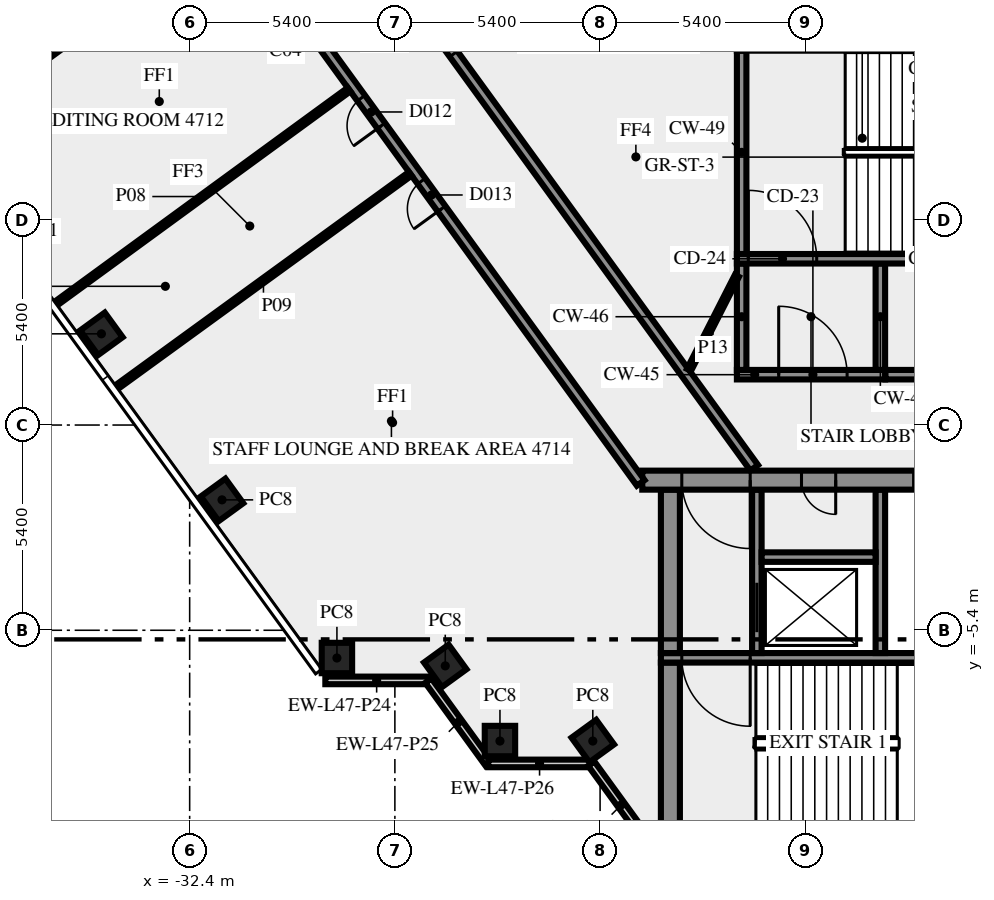
"""IFC4 building model, lengths in metres.
Left out: names, types, materials, properties, quantities, classifications, styles, units other than length and angle.
Written with IfcOpenShell. Run it as: python <this file> out.ifc"""

import sys

from ifc_helpers import new_model, si_unit, direction, frame, frame_2d, origin, origin_2d, place, context, subcontext, project, spatial, rectangle, extrude, element, fill, save


model = new_model("IFC4")
c1 = context("Model", 3, precision=1e-05, world=origin(), true_north=direction((0.0, 1.0)))
c2 = subcontext(c1, "Body", "Model", "MODEL_VIEW")
j1 = project(units=[si_unit("LENGTHUNIT", "METRE"), si_unit("PLANEANGLEUNIT", "RADIAN")], contexts=[c1])
p1 = place(None, origin())
s1 = spatial("IfcSite", under=j1, at=p1, CompositionType="ELEMENT")
p2 = place(p1, origin())
s2 = spatial("IfcBuilding", under=s1, at=p2, CompositionType="ELEMENT")
p3 = place(p2, frame((0.0, 0.0, 202.0)))
s3 = spatial("IfcBuildingStorey", under=s2, at=p3, CompositionType="ELEMENT", Elevation=202.0)
for number, where, z_axis, x_axis in (
    (1, (-34.722, 2.4, 0.0), (0.0, 0.0, 1.0), (0.588, -0.809, 0.0)),
    (2, (-31.548, -1.969, 0.0), (0.0, 0.0, 1.0), (0.588, -0.809, 0.0)),
    (3, (-28.525, -6.13, 0.0), (0.0, 0.0, 1.0), (1.0, 0.0, 0.0)),
    (4, (-25.674, -6.337, 0.0), (0.0, 0.0, 1.0), (0.588, -0.809, 0.0)),
    (5, (-24.235, -8.315, 0.0), (0.0, 0.0, 1.0), (1.0, 0.0, 0.0)),
    (6, (-21.792, -8.315, 0.0), (0.0, 0.0, 1.0), (0.588, -0.809, 0.0)),
):
    element("IfcColumn", number, at=place(p3, frame(where, z_axis=z_axis, x_axis=x_axis)), inside=s3, PredefinedType="COLUMN", context=c2, shape_type="SweptSolid", body=[
        extrude(rectangle(XDim=0.8, YDim=0.8, at=origin_2d()), origin(), (0.0, 0.0, 1.0), 3.65),
    ])
p4 = place(p3, frame((-28.83, -6.719, 0.0), z_axis=(0.0, 0.0, 1.0), x_axis=(1.0, 0.0, 0.0)))
e7 = element("IfcWall", 7, at=p4, inside=s3, PredefinedType="SOLIDWALL", context=c2, shape_type="SweptSolid", body=[
    extrude(rectangle(XDim=2.7, YDim=0.2, at=frame_2d((1.35, 0.0))), origin(), (0.0, 0.0, 1.0), 3.65),
])
p5 = place(p3, frame((-26.12, -6.724, 0.0), z_axis=(0.0, 0.0, 1.0), x_axis=(0.587720002413, -0.809064397168, 0.0)))
e8 = element("IfcWall", 8, at=p5, inside=s3, PredefinedType="SOLIDWALL", context=c2, shape_type="SweptSolid", body=[
    extrude(rectangle(XDim=2.7, YDim=0.2, at=frame_2d((1.35, 0.0))), origin(), (0.0, 0.0, 1.0), 3.65),
])
p6 = place(p3, frame((-24.543, -8.904, 0.0), z_axis=(0.0, 0.0, 1.0), x_axis=(1.0, 0.0, 0.0)))
e9 = element("IfcWall", 9, at=p6, inside=s3, PredefinedType="SOLIDWALL", context=c2, shape_type="SweptSolid", body=[
    extrude(rectangle(XDim=2.7, YDim=0.2, at=frame_2d((1.35, 0.0))), origin(), (0.0, 0.0, 1.0), 3.65),
])
p7 = place(p3, frame((-21.833, -8.909, 0.0), z_axis=(0.0, 0.0, 1.0), x_axis=(0.587766567315, -0.809030569476, 0.0)))
e10 = element("IfcWall", 10, at=p7, inside=s3, PredefinedType="SOLIDWALL", context=c2, shape_type="SweptSolid", body=[
    extrude(rectangle(XDim=2.688, YDim=0.2, at=frame_2d((1.344, 0.0))), origin(), (0.0, 0.0, 1.0), 3.65),
])
p8 = place(p3, frame((-19.75, -10.5, 0.0), z_axis=(0.0, 0.0, 1.0), x_axis=(0.0, 1.0, 0.0)))
e11 = element("IfcWall", 11, at=p8, inside=s3, PredefinedType="SHEAR", context=c2, shape_type="SweptSolid", body=[
    extrude(rectangle(XDim=4.25, YDim=0.5, at=frame_2d((2.125, 0.0))), origin(), (0.0, 0.0, 1.0), 3.65),
])
p9 = place(p3, frame((-9.2, -6.125, 0.0), z_axis=(0.0, 0.0, 1.0), x_axis=(-1.0, 0.0, 0.0)))
e12 = element("IfcWall", 12, at=p9, inside=s3, PredefinedType="SHEAR", context=c2, shape_type="SweptSolid", body=[
    extrude(rectangle(XDim=10.8, YDim=0.25, at=frame_2d((5.4, 0.0))), origin(), (0.0, 0.0, 1.0), 3.65),
])
p10 = place(p9, frame((8.45, 0.0, 0.0)))
e13 = element("IfcOpeningElement", 13, at=p10, cuts=e12, PredefinedType="OPENING", context=c2, shape_type="SweptSolid", body=[
    extrude(rectangle(XDim=1.8, YDim=2.1, at=frame_2d((0.9, 1.05))), frame((0.0, 0.135, 0.0), z_axis=(0.0, -1.0, 0.0), x_axis=(1.0, 0.0, 0.0)), (0.0, 0.0, 1.0), 0.27),
])
p11 = place(p3, frame((-19.75, -6.0, 0.0), z_axis=(0.0, 0.0, 1.0), x_axis=(0.0, 1.0, 0.0)))
e14 = element("IfcWall", 14, at=p11, inside=s3, PredefinedType="SHEAR", context=c2, shape_type="SweptSolid", body=[
    extrude(rectangle(XDim=4.3, YDim=0.5, at=frame_2d((2.15, 0.0))), origin(), (0.0, 0.0, 1.0), 3.65),
])
p12 = place(p3, frame((-17.475, -6.0, 0.0), z_axis=(0.0, 0.0, 1.0), x_axis=(0.0, 1.0, 0.0)))
e15 = element("IfcWall", 15, at=p12, inside=s3, PredefinedType="SHEAR", context=c2, shape_type="SweptSolid", body=[
    extrude(rectangle(XDim=4.3, YDim=0.25, at=frame_2d((2.15, 0.0))), origin(), (0.0, 0.0, 1.0), 3.65),
])
p13 = place(p12, frame((0.55, 0.0, 0.0)))
e16 = element("IfcOpeningElement", 16, at=p13, cuts=e15, PredefinedType="OPENING", context=c2, shape_type="SweptSolid", body=[
    extrude(rectangle(XDim=1.3, YDim=2.1, at=frame_2d((0.65, 1.05))), frame((0.0, 0.135, 0.0), z_axis=(0.0, -1.0, 0.0), x_axis=(1.0, 0.0, 0.0)), (0.0, 0.0, 1.0), 0.27),
])
p14 = place(p3, frame((-14.225, -6.0, 0.0), z_axis=(0.0, 0.0, 1.0), x_axis=(0.0, 1.0, 0.0)))
e17 = element("IfcWall", 17, at=p14, inside=s3, PredefinedType="SHEAR", context=c2, shape_type="SweptSolid", body=[
    extrude(rectangle(XDim=4.3, YDim=0.25, at=frame_2d((2.15, 0.0))), origin(), (0.0, 0.0, 1.0), 3.65),
])
p15 = place(p3, frame((-17.35, -3.475, 0.0), z_axis=(0.0, 0.0, 1.0), x_axis=(1.0, 0.0, 0.0)))
e18 = element("IfcWall", 18, at=p15, inside=s3, PredefinedType="SHEAR", context=c2, shape_type="SweptSolid", body=[
    extrude(rectangle(XDim=3.0, YDim=0.25, at=frame_2d((1.5, 0.0))), origin(), (0.0, 0.0, 1.0), 3.65),
])
p16 = place(p3, frame((20.49, -1.45, 0.0), z_axis=(0.0, 0.0, 1.0), x_axis=(-1.0, 0.0, 0.0)))
e19 = element("IfcWall", 19, at=p16, inside=s3, PredefinedType="SHEAR", context=c2, shape_type="SweptSolid", body=[
    extrude(rectangle(XDim=40.98, YDim=0.5, at=frame_2d((20.49, 0.0))), origin(), (0.0, 0.0, 1.0), 3.65),
])
p17 = place(p16, frame((38.14, 0.0, 0.0)))
e20 = element("IfcOpeningElement", 20, at=p17, cuts=e19, PredefinedType="OPENING", context=c2, shape_type="SweptSolid", body=[
    extrude(rectangle(XDim=1.8, YDim=2.1, at=frame_2d((0.9, 1.05))), frame((0.0, 0.26, 0.0), z_axis=(0.0, -1.0, 0.0), x_axis=(1.0, 0.0, 0.0)), (0.0, 0.0, 1.0), 0.52),
])
p18 = place(p16, frame((35.89, 0.0, 0.0)))
e21 = element("IfcOpeningElement", 21, at=p18, cuts=e19, PredefinedType="OPENING", context=c2, shape_type="SweptSolid", body=[
    extrude(rectangle(XDim=0.9, YDim=2.1, at=frame_2d((0.45, 1.05))), frame((0.0, 0.26, 0.0), z_axis=(0.0, -1.0, 0.0), x_axis=(1.0, 0.0, 0.0)), (0.0, 0.0, 1.0), 0.52),
])
p19 = place(p16, frame((32.94, 0.0, 0.0)))
e22 = element("IfcOpeningElement", 22, at=p19, cuts=e19, PredefinedType="OPENING", context=c2, shape_type="SweptSolid", body=[
    extrude(rectangle(XDim=0.9, YDim=2.1, at=frame_2d((0.45, 1.05))), frame((0.0, 0.26, 0.0), z_axis=(0.0, -1.0, 0.0), x_axis=(1.0, 0.0, 0.0)), (0.0, 0.0, 1.0), 0.52),
])
p20 = place(p16, frame((30.302, 0.0, 0.0)))
e23 = element("IfcOpeningElement", 23, at=p20, cuts=e19, PredefinedType="OPENING", context=c2, shape_type="SweptSolid", body=[
    extrude(rectangle(XDim=0.9, YDim=2.1, at=frame_2d((0.45, 1.05))), frame((0.0, 0.26, 0.0), z_axis=(0.0, -1.0, 0.0), x_axis=(1.0, 0.0, 0.0)), (0.0, 0.0, 1.0), 0.52),
])
p21 = place(p16, frame((26.577, 0.0, 0.0)))
e24 = element("IfcOpeningElement", 24, at=p21, cuts=e19, PredefinedType="OPENING", context=c2, shape_type="SweptSolid", body=[
    extrude(rectangle(XDim=0.9, YDim=2.1, at=frame_2d((0.45, 1.05))), frame((0.0, 0.26, 0.0), z_axis=(0.0, -1.0, 0.0), x_axis=(1.0, 0.0, 0.0)), (0.0, 0.0, 1.0), 0.52),
])
p22 = place(p16, frame((19.59, 0.0, 0.0)))
e25 = element("IfcOpeningElement", 25, at=p22, cuts=e19, PredefinedType="OPENING", context=c2, shape_type="SweptSolid", body=[
    extrude(rectangle(XDim=2.0, YDim=2.1, at=frame_2d((1.0, 1.05))), frame((0.0, 0.26, 0.0), z_axis=(0.0, -1.0, 0.0), x_axis=(1.0, 0.0, 0.0)), (0.0, 0.0, 1.0), 0.52),
])
p23 = place(p16, frame((7.14, 0.0, 0.0)))
e26 = element("IfcOpeningElement", 26, at=p23, cuts=e19, PredefinedType="OPENING", context=c2, shape_type="SweptSolid", body=[
    extrude(rectangle(XDim=0.9, YDim=2.1, at=frame_2d((0.45, 1.05))), frame((0.0, 0.26, 0.0), z_axis=(0.0, -1.0, 0.0), x_axis=(1.0, 0.0, 0.0)), (0.0, 0.0, 1.0), 0.52),
])
p24 = place(p16, frame((5.028, 0.0, 0.0)))
e27 = element("IfcOpeningElement", 27, at=p24, cuts=e19, PredefinedType="OPENING", context=c2, shape_type="SweptSolid", body=[
    extrude(rectangle(XDim=0.8, YDim=2.1, at=frame_2d((0.4, 1.05))), frame((0.0, 0.26, 0.0), z_axis=(0.0, -1.0, 0.0), x_axis=(1.0, 0.0, 0.0)), (0.0, 0.0, 1.0), 0.52),
])
p25 = place(p16, frame((3.452, 0.0, 0.0)))
e28 = element("IfcOpeningElement", 28, at=p25, cuts=e19, PredefinedType="OPENING", context=c2, shape_type="SweptSolid", body=[
    extrude(rectangle(XDim=0.8, YDim=2.1, at=frame_2d((0.4, 1.05))), frame((0.0, 0.26, 0.0), z_axis=(0.0, -1.0, 0.0), x_axis=(1.0, 0.0, 0.0)), (0.0, 0.0, 1.0), 0.52),
])
p26 = place(p16, frame((1.04, 0.0, 0.0)))
e29 = element("IfcOpeningElement", 29, at=p26, cuts=e19, PredefinedType="OPENING", context=c2, shape_type="SweptSolid", body=[
    extrude(rectangle(XDim=1.8, YDim=2.1, at=frame_2d((0.9, 1.05))), frame((0.0, 0.26, 0.0), z_axis=(0.0, -1.0, 0.0), x_axis=(1.0, 0.0, 0.0)), (0.0, 0.0, 1.0), 0.52),
])
p27 = place(p3, frame((-18.0, 1.325, 0.0), z_axis=(0.0, 0.0, 1.0), x_axis=(1.0, 0.0, 0.0)))
e30 = element("IfcWall", 30, at=p27, inside=s3, PredefinedType="SHEAR", context=c2, shape_type="SweptSolid", body=[
    extrude(rectangle(XDim=3.9, YDim=0.25, at=frame_2d((1.95, 0.0))), origin(), (0.0, 0.0, 1.0), 3.65),
])
p28 = place(p27, frame((1.1, 0.0, 0.0)))
e31 = element("IfcOpeningElement", 31, at=p28, cuts=e30, PredefinedType="OPENING", context=c2, shape_type="SweptSolid", body=[
    extrude(rectangle(XDim=1.8, YDim=2.1, at=frame_2d((0.9, 1.05))), frame((0.0, 0.135, 0.0), z_axis=(0.0, -1.0, 0.0), x_axis=(1.0, 0.0, 0.0)), (0.0, 0.0, 1.0), 0.27),
])
for number, where, z_axis, x_axis in (
    (32, (-17.875, 1.45, 0.0), (0.0, 0.0, 1.0), (0.0, 1.0, 0.0)),
    (33, (-14.225, 1.45, 0.0), (0.0, 0.0, 1.0), (0.0, 1.0, 0.0)),
):
    element("IfcWall", number, at=place(p3, frame(where, z_axis=z_axis, x_axis=x_axis)), inside=s3, PredefinedType="SHEAR", context=c2, shape_type="SweptSolid", body=[
        extrude(rectangle(XDim=2.8, YDim=0.25, at=frame_2d((1.4, 0.0))), origin(), (0.0, 0.0, 1.0), 3.65),
    ])
p29 = place(p3, frame((-18.0, 4.375, 0.0), z_axis=(0.0, 0.0, 1.0), x_axis=(1.0, 0.0, 0.0)))
e34 = element("IfcWall", 34, at=p29, inside=s3, PredefinedType="SHEAR", context=c2, shape_type="SweptSolid", body=[
    extrude(rectangle(XDim=10.5, YDim=0.25, at=frame_2d((5.25, 0.0))), origin(), (0.0, 0.0, 1.0), 3.65),
])
p30 = place(p29, frame((0.3, 0.0, 0.0)))
e35 = element("IfcOpeningElement", 35, at=p30, cuts=e34, PredefinedType="OPENING", context=c2, shape_type="SweptSolid", body=[
    extrude(rectangle(XDim=1.8, YDim=2.1, at=frame_2d((0.9, 1.05))), frame((0.0, 0.135, 0.0), z_axis=(0.0, -1.0, 0.0), x_axis=(1.0, 0.0, 0.0)), (0.0, 0.0, 1.0), 0.27),
])
p31 = place(p3, frame((-17.875, 4.5, 0.0), z_axis=(0.0, 0.0, 1.0), x_axis=(0.0, 1.0, 0.0)))
e36 = element("IfcWall", 36, at=p31, inside=s3, PredefinedType="SHEAR", context=c2, shape_type="SweptSolid", body=[
    extrude(rectangle(XDim=5.35, YDim=0.25, at=frame_2d((2.675, 0.0))), origin(), (0.0, 0.0, 1.0), 3.65),
])
p32 = place(p3, frame((-20.531, -1.523, 0.0), z_axis=(0.0, 0.0, 1.0), x_axis=(-0.587785812891, 0.809016587076, 0.0)))
e37 = element("IfcWall", 37, at=p32, inside=s3, PredefinedType="SOLIDWALL", context=c2, shape_type="SweptSolid", body=[
    extrude(rectangle(XDim=28.67, YDim=0.25, at=frame_2d((14.335, 0.0))), origin(), (0.0, 0.0, 1.0), 3.65),
])
p33 = place(p32, frame((17.015, 0.0, 0.0)))
e38 = element("IfcOpeningElement", 38, at=p33, cuts=e37, PredefinedType="OPENING", context=c2, shape_type="SweptSolid", body=[
    extrude(rectangle(XDim=0.9, YDim=2.1, at=frame_2d((0.45, 1.05))), frame((0.0, 0.135, 0.0), z_axis=(0.0, -1.0, 0.0), x_axis=(1.0, 0.0, 0.0)), (0.0, 0.0, 1.0), 0.27),
])
p34 = place(p32, frame((8.916, 0.0, 0.0)))
e39 = element("IfcOpeningElement", 39, at=p34, cuts=e37, PredefinedType="OPENING", context=c2, shape_type="SweptSolid", body=[
    extrude(rectangle(XDim=0.9, YDim=2.1, at=frame_2d((0.45, 1.05))), frame((0.0, 0.135, 0.0), z_axis=(0.0, -1.0, 0.0), x_axis=(1.0, 0.0, 0.0)), (0.0, 0.0, 1.0), 0.27),
])
p35 = place(p32, frame((18.616, 0.0, 0.0)))
e40 = element("IfcOpeningElement", 40, at=p35, cuts=e37, PredefinedType="OPENING", context=c2, shape_type="SweptSolid", body=[
    extrude(rectangle(XDim=0.9, YDim=2.1, at=frame_2d((0.45, 1.05))), frame((0.0, 0.135, 0.0), z_axis=(0.0, -1.0, 0.0), x_axis=(1.0, 0.0, 0.0)), (0.0, 0.0, 1.0), 0.27),
])
p36 = place(p32, frame((11.615, 0.0, 0.0)))
e41 = element("IfcOpeningElement", 41, at=p36, cuts=e37, PredefinedType="OPENING", context=c2, shape_type="SweptSolid", body=[
    extrude(rectangle(XDim=0.9, YDim=2.1, at=frame_2d((0.45, 1.05))), frame((0.0, 0.135, 0.0), z_axis=(0.0, -1.0, 0.0), x_axis=(1.0, 0.0, 0.0)), (0.0, 0.0, 1.0), 0.27),
])
p37 = place(p3, frame((-35.092, 23.027, 0.0), z_axis=(0.0, 0.0, 1.0), x_axis=(0.587784076945, -0.809017848313, 0.0)))
e42 = element("IfcWall", 42, at=p37, inside=s3, PredefinedType="SOLIDWALL", context=c2, shape_type="SweptSolid", body=[
    extrude(rectangle(XDim=29.853, YDim=0.25, at=frame_2d((14.927, 0.0))), origin(), (0.0, 0.0, 1.0), 3.65),
])
p38 = place(p37, frame((10.095, 0.0, 0.0)))
e43 = element("IfcOpeningElement", 43, at=p38, cuts=e42, PredefinedType="OPENING", context=c2, shape_type="SweptSolid", body=[
    extrude(rectangle(XDim=0.9, YDim=2.1, at=frame_2d((0.45, 1.05))), frame((0.0, 0.135, 0.0), z_axis=(0.0, -1.0, 0.0), x_axis=(1.0, 0.0, 0.0)), (0.0, 0.0, 1.0), 0.27),
])
p39 = place(p37, frame((15.495, 0.0, 0.0)))
e44 = element("IfcOpeningElement", 44, at=p39, cuts=e42, PredefinedType="OPENING", context=c2, shape_type="SweptSolid", body=[
    extrude(rectangle(XDim=0.9, YDim=2.1, at=frame_2d((0.45, 1.05))), frame((0.0, 0.135, 0.0), z_axis=(0.0, -1.0, 0.0), x_axis=(1.0, 0.0, 0.0)), (0.0, 0.0, 1.0), 0.27),
])
p40 = place(p37, frame((0.224, 0.0, 0.0)))
e45 = element("IfcOpeningElement", 45, at=p40, cuts=e42, PredefinedType="OPENING", context=c2, shape_type="SweptSolid", body=[
    extrude(rectangle(XDim=0.9, YDim=2.1, at=frame_2d((0.45, 1.05))), frame((0.0, 0.135, 0.0), z_axis=(0.0, -1.0, 0.0), x_axis=(1.0, 0.0, 0.0)), (0.0, 0.0, 1.0), 0.27),
])
p41 = place(p3, frame((-14.09, 1.325, 0.0), z_axis=(0.0, 0.0, 1.0), x_axis=(1.0, 0.0, 0.0)))
e46 = element("IfcWall", 46, at=p41, inside=s3, PredefinedType="SOLIDWALL", context=c2, shape_type="SweptSolid", body=[
    extrude(rectangle(XDim=9.431, YDim=0.25, at=frame_2d((4.716, 0.0))), origin(), (0.0, 0.0, 1.0), 3.65),
])
p42 = place(p41, frame((5.642, 0.0, 0.0)))
e47 = element("IfcOpeningElement", 47, at=p42, cuts=e46, PredefinedType="OPENING", context=c2, shape_type="SweptSolid", body=[
    extrude(rectangle(XDim=0.9, YDim=2.1, at=frame_2d((0.45, 1.05))), frame((0.0, 0.135, 0.0), z_axis=(0.0, -1.0, 0.0), x_axis=(1.0, 0.0, 0.0)), (0.0, 0.0, 1.0), 0.27),
])
p43 = place(p3, frame((-31.356, 13.164, 0.0), z_axis=(0.0, 0.0, 1.0), x_axis=(-0.809102944047, -0.587666934526, 0.0)))
e48 = element("IfcWall", 48, at=p43, inside=s3, PredefinedType="PARTITIONING", context=c2, shape_type="SweptSolid", body=[
    extrude(rectangle(XDim=9.55, YDim=0.12, at=frame_2d((4.775, 0.0))), origin(), (0.0, 0.0, 1.0), 2.85),
])
p44 = place(p3, frame((-35.919, 3.197, 0.0), z_axis=(0.0, 0.0, 1.0), x_axis=(0.807645841498, 0.589667868135, 0.0)))
e49 = element("IfcWall", 49, at=p44, inside=s3, PredefinedType="PARTITIONING", context=c2, shape_type="SweptSolid", body=[
    extrude(rectangle(XDim=9.551, YDim=0.12, at=frame_2d((4.775, 0.0))), origin(), (0.0, 0.0, 1.0), 2.85),
])
p45 = place(p3, frame((-26.595, 6.611, 0.0), z_axis=(0.0, 0.0, 1.0), x_axis=(-0.80900684162, -0.587799226107, 0.0)))
e50 = element("IfcWall", 50, at=p45, inside=s3, PredefinedType="PARTITIONING", context=c2, shape_type="SweptSolid", body=[
    extrude(rectangle(XDim=9.55, YDim=0.12, at=frame_2d((4.775, 0.0))), origin(), (0.0, 0.0, 1.0), 2.85),
])
p46 = place(p3, frame((-19.261, 1.45, 0.0), z_axis=(0.0, 0.0, 1.0), x_axis=(0.453950796792, 0.891026752736, 0.0)))
e51 = element("IfcWall", 51, at=p46, inside=s3, PredefinedType="PARTITIONING", context=c2, shape_type="SweptSolid", body=[
    extrude(rectangle(XDim=2.778, YDim=0.12, at=frame_2d((1.389, 0.0))), origin(), (0.0, 0.0, 1.0), 3.65),
])
p47 = place(p10, origin())
e52 = element("IfcDoor", 52, at=p47, inside=s3, OperationType="DOUBLE_DOOR_SINGLE_SWING", PredefinedType="DOOR", context=c2, shape_type="SweptSolid", body=[
    extrude(rectangle(XDim=1.8, YDim=2.1, at=frame_2d((0.9, 1.05))), frame((0.0, 0.025, 0.0), z_axis=(0.0, -1.0, 0.0), x_axis=(1.0, 0.0, 0.0)), (0.0, 0.0, 1.0), 0.05),
])
fill(e13, e52)
p48 = place(p13, origin())
e53 = element("IfcDoor", 53, at=p48, inside=s3, OperationType="DOUBLE_DOOR_SLIDING", PredefinedType="DOOR", context=c2, shape_type="SweptSolid", body=[
    extrude(rectangle(XDim=1.3, YDim=2.1, at=frame_2d((0.65, 1.05))), frame((0.0, 0.025, 0.0), z_axis=(0.0, -1.0, 0.0), x_axis=(1.0, 0.0, 0.0)), (0.0, 0.0, 1.0), 0.05),
])
fill(e16, e53)
p49 = place(p17, origin())
e54 = element("IfcDoor", 54, at=p49, inside=s3, OperationType="DOUBLE_DOOR_SINGLE_SWING", PredefinedType="DOOR", context=c2, shape_type="SweptSolid", body=[
    extrude(rectangle(XDim=1.8, YDim=2.1, at=frame_2d((0.9, 1.05))), frame((0.0, 0.025, 0.0), z_axis=(0.0, -1.0, 0.0), x_axis=(1.0, 0.0, 0.0)), (0.0, 0.0, 1.0), 0.05),
])
fill(e20, e54)
p50 = place(p18, origin())
e55 = element("IfcDoor", 55, at=p50, inside=s3, OperationType="SINGLE_SWING_RIGHT", PredefinedType="DOOR", context=c2, shape_type="SweptSolid", body=[
    extrude(rectangle(XDim=0.9, YDim=2.1, at=frame_2d((0.45, 1.05))), frame((0.0, 0.025, 0.0), z_axis=(0.0, -1.0, 0.0), x_axis=(1.0, 0.0, 0.0)), (0.0, 0.0, 1.0), 0.05),
])
fill(e21, e55)
p51 = place(p28, origin())
e56 = element("IfcDoor", 56, at=p51, inside=s3, OperationType="DOUBLE_DOOR_SINGLE_SWING", PredefinedType="DOOR", context=c2, shape_type="SweptSolid", body=[
    extrude(rectangle(XDim=1.8, YDim=2.1, at=frame_2d((0.9, 1.05))), frame((0.0, 0.025, 0.0), z_axis=(0.0, -1.0, 0.0), x_axis=(1.0, 0.0, 0.0)), (0.0, 0.0, 1.0), 0.05),
])
fill(e31, e56)
p52 = place(p30, origin())
e57 = element("IfcDoor", 57, at=p52, inside=s3, OperationType="DOUBLE_DOOR_SINGLE_SWING", PredefinedType="DOOR", context=c2, shape_type="SweptSolid", body=[
    extrude(rectangle(XDim=1.8, YDim=2.1, at=frame_2d((0.9, 1.05))), frame((0.0, 0.025, 0.0), z_axis=(0.0, -1.0, 0.0), x_axis=(1.0, 0.0, 0.0)), (0.0, 0.0, 1.0), 0.05),
])
fill(e35, e57)
p53 = place(p39, origin())
e58 = element("IfcDoor", 58, at=p53, inside=s3, OperationType="SINGLE_SWING_LEFT", PredefinedType="DOOR", context=c2, shape_type="SweptSolid", body=[
    extrude(rectangle(XDim=0.9, YDim=2.1, at=frame_2d((0.45, 1.05))), frame((0.0, 0.025, 0.0), z_axis=(0.0, -1.0, 0.0), x_axis=(1.0, 0.0, 0.0)), (0.0, 0.0, 1.0), 0.05),
])
fill(e44, e58)
p54 = place(p34, origin())
e59 = element("IfcDoor", 59, at=p54, inside=s3, OperationType="SINGLE_SWING_RIGHT", PredefinedType="DOOR", context=c2, shape_type="SweptSolid", body=[
    extrude(rectangle(XDim=0.9, YDim=2.1, at=frame_2d((0.45, 1.05))), frame((0.0, 0.025, 0.0), z_axis=(0.0, -1.0, 0.0), x_axis=(1.0, 0.0, 0.0)), (0.0, 0.0, 1.0), 0.05),
])
fill(e39, e59)
p55 = place(p36, origin())
e60 = element("IfcDoor", 60, at=p55, inside=s3, OperationType="SINGLE_SWING_RIGHT", PredefinedType="DOOR", context=c2, shape_type="SweptSolid", body=[
    extrude(rectangle(XDim=0.9, YDim=2.1, at=frame_2d((0.45, 1.05))), frame((0.0, 0.025, 0.0), z_axis=(0.0, -1.0, 0.0), x_axis=(1.0, 0.0, 0.0)), (0.0, 0.0, 1.0), 0.05),
])
fill(e41, e60)
save(model, sys.argv[1])
